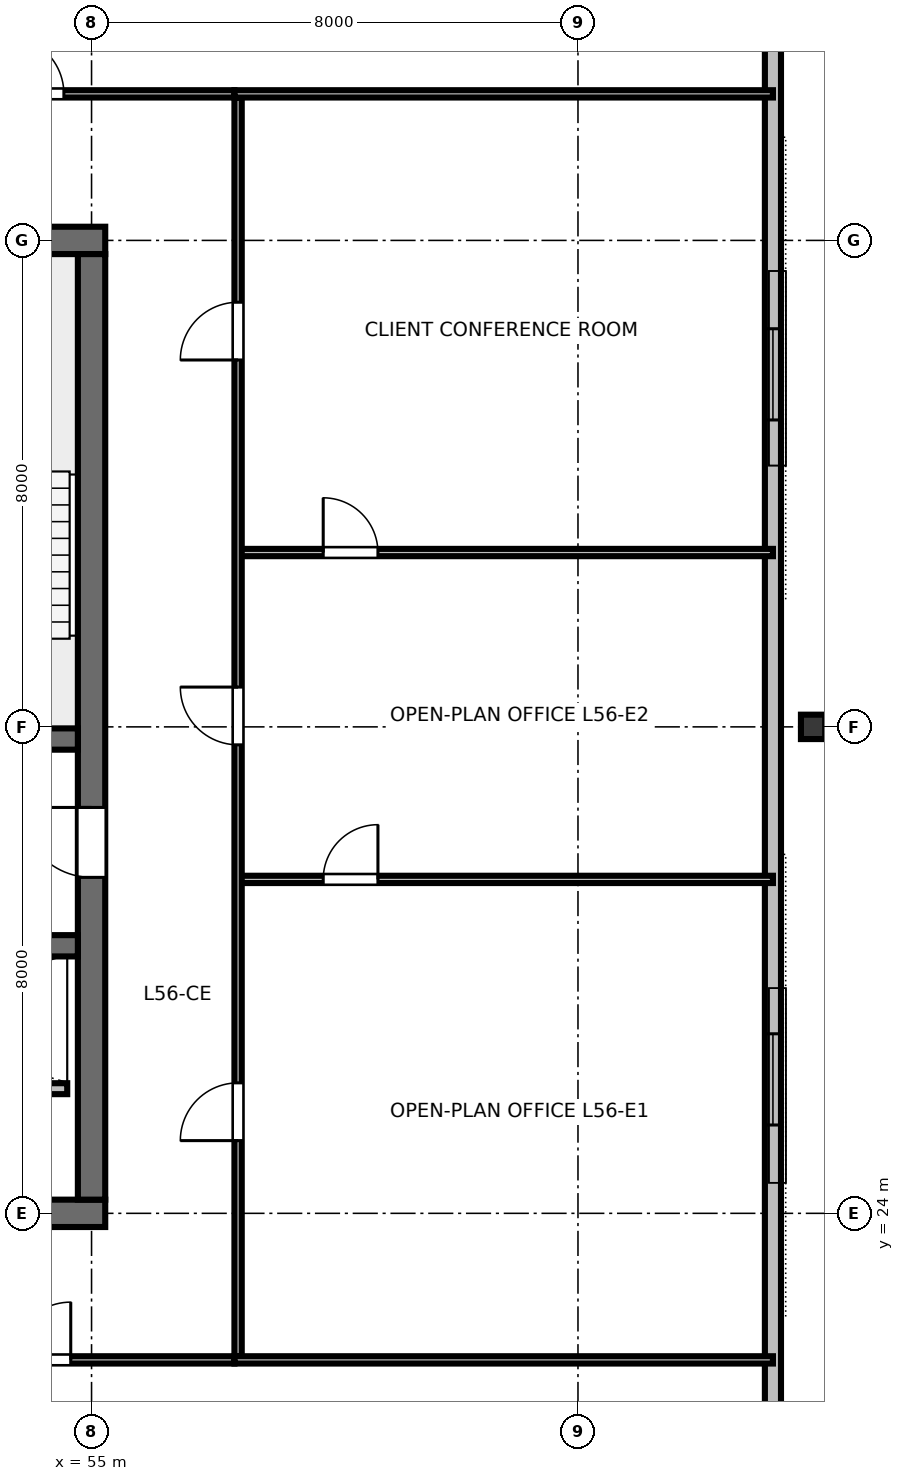
"""IFC4 building model, lengths in metres.
Left out: names, types, materials, properties, quantities, classifications, styles, units other than length and angle.
Written with IfcOpenShell. Run it as: python <this file> out.ifc"""

import sys

from ifc_helpers import new_model, si_unit, direction, frame, frame_2d, origin, origin_2d, place, context, subcontext, project, spatial, rectangle, i_section, extrude, element, fill, save


model = new_model("IFC4")
c1 = context("Model", 3, precision=1e-05, world=origin(), true_north=direction((0.0, 1.0)))
c2 = subcontext(c1, "Body", "Model", "MODEL_VIEW")
j1 = project(units=[si_unit("LENGTHUNIT", "METRE"), si_unit("PLANEANGLEUNIT", "RADIAN")], contexts=[c1])
p1 = place(None, origin())
s1 = spatial("IfcSite", under=j1, at=p1, CompositionType="ELEMENT")
p2 = place(p1, origin())
s2 = spatial("IfcBuilding", under=s1, at=p2, CompositionType="ELEMENT")
p3 = place(p2, frame((0.0, 0.0, 213.0)))
s3 = spatial("IfcBuildingStorey", under=s2, at=p3, CompositionType="ELEMENT", Elevation=213.0)
p4 = place(p3, frame((36.775, 24.0, 0.0), z_axis=(0.0, 0.0, 1.0), x_axis=(1.0, 0.0, 0.0)))
e1 = element("IfcWall", 1, at=p4, inside=s3, PredefinedType="SHEAR", context=c2, shape_type="SweptSolid", body=[
    extrude(rectangle(XDim=18.45, YDim=0.45, at=frame_2d((9.225, 0.0))), origin(), (0.0, 0.0, 1.0), 3.36),
])
p5 = place(p4, frame((13.425, 0.0, 0.0)))
e2 = element("IfcOpeningElement", 2, at=p5, cuts=e1, PredefinedType="OPENING", context=c2, shape_type="SweptSolid", body=[
    extrude(rectangle(XDim=1.6, YDim=2.15, at=frame_2d((0.8, 1.075))), frame((0.0, 0.235, 0.0), z_axis=(0.0, -1.0, 0.0), x_axis=(1.0, 0.0, 0.0)), (0.0, 0.0, 1.0), 0.47),
])
p6 = place(p3, frame((36.775, 40.0, 0.0), z_axis=(0.0, 0.0, 1.0), x_axis=(1.0, 0.0, 0.0)))
e3 = element("IfcWall", 3, at=p6, inside=s3, PredefinedType="SHEAR", context=c2, shape_type="SweptSolid", body=[
    extrude(rectangle(XDim=18.45, YDim=0.45, at=frame_2d((9.225, 0.0))), origin(), (0.0, 0.0, 1.0), 3.36),
])
p7 = place(p6, frame((8.725, 0.0, 0.0)))
e4 = element("IfcOpeningElement", 4, at=p7, cuts=e3, PredefinedType="OPENING", context=c2, shape_type="SweptSolid", body=[
    extrude(rectangle(XDim=1.0, YDim=2.15, at=frame_2d((0.5, 1.075))), frame((0.0, 0.235, 0.0), z_axis=(0.0, -1.0, 0.0), x_axis=(1.0, 0.0, 0.0)), (0.0, 0.0, 1.0), 0.47),
])
p8 = place(p3, frame((55.0, 24.225, 0.0), z_axis=(0.0, 0.0, 1.0), x_axis=(0.0, 1.0, 0.0)))
e5 = element("IfcWall", 5, at=p8, inside=s3, PredefinedType="SHEAR", context=c2, shape_type="SweptSolid", body=[
    extrude(rectangle(XDim=15.55, YDim=0.45, at=frame_2d((7.775, 0.0))), origin(), (0.0, 0.0, 1.0), 3.36),
])
p9 = place(p8, frame((5.3, 0.0, 0.0)))
e6 = element("IfcOpeningElement", 6, at=p9, cuts=e5, PredefinedType="OPENING", context=c2, shape_type="SweptSolid", body=[
    extrude(rectangle(XDim=1.15, YDim=2.15, at=frame_2d((0.575, 1.075))), frame((0.0, 0.235, 0.0), z_axis=(0.0, -1.0, 0.0), x_axis=(1.0, 0.0, 0.0)), (0.0, 0.0, 1.0), 0.47),
])
p10 = place(p3, frame((37.225, 31.8, 0.0), z_axis=(0.0, 0.0, 1.0), x_axis=(1.0, 0.0, 0.0)))
e7 = element("IfcWall", 7, at=p10, inside=s3, PredefinedType="SHEAR", context=c2, shape_type="SweptSolid", body=[
    extrude(rectangle(XDim=17.55, YDim=0.35, at=frame_2d((8.775, 0.0))), origin(), (0.0, 0.0, 1.0), 3.36),
])
p11 = place(p10, frame((0.825, 0.0, 0.0)))
e8 = element("IfcOpeningElement", 8, at=p11, cuts=e7, PredefinedType="OPENING", context=c2, shape_type="SweptSolid", body=[
    extrude(rectangle(XDim=1.1, YDim=2.15, at=frame_2d((0.55, 1.075))), frame((0.0, 0.185, 0.0), z_axis=(0.0, -1.0, 0.0), x_axis=(1.0, 0.0, 0.0)), (0.0, 0.0, 1.0), 0.37),
])
p12 = place(p10, frame((14.725, 0.0, 0.0)))
e9 = element("IfcOpeningElement", 9, at=p12, cuts=e7, PredefinedType="OPENING", context=c2, shape_type="SweptSolid", body=[
    extrude(rectangle(XDim=1.1, YDim=2.15, at=frame_2d((0.55, 1.075))), frame((0.0, 0.185, 0.0), z_axis=(0.0, -1.0, 0.0), x_axis=(1.0, 0.0, 0.0)), (0.0, 0.0, 1.0), 0.37),
])
p13 = place(p3, frame((37.225, 28.4, 0.0), z_axis=(0.0, 0.0, 1.0), x_axis=(1.0, 0.0, 0.0)))
e10 = element("IfcWall", 10, at=p13, inside=s3, PredefinedType="SHEAR", context=c2, shape_type="SweptSolid", body=[
    extrude(rectangle(XDim=17.55, YDim=0.35, at=frame_2d((8.775, 0.0))), origin(), (0.0, 0.0, 1.0), 3.36),
])
p14 = place(p3, frame((66.866, 32.0, 0.0), z_axis=(0.0, 0.0, 1.0), x_axis=(0.0, 1.0, 0.0)))
e11 = element("IfcColumn", 11, at=p14, inside=s3, PredefinedType="COLUMN", context=c2, shape_type="SweptSolid", body=[
    extrude(i_section(OverallWidth=0.401, OverallDepth=0.399, WebThickness=0.025, FlangeThickness=0.04, FilletRadius=0.025, at=origin_2d()), origin(), (0.0, 0.0, 1.0), 3.373),
])
p15 = place(p3, frame((66.206, 19.305, 0.0), z_axis=(0.0, 0.0, 1.0), x_axis=(0.0, 1.0, 0.0)))
e12 = element("IfcWall", 12, at=p15, inside=s3, PredefinedType="STANDARD", context=c2, shape_type="SweptSolid", body=[
    extrude(rectangle(XDim=25.389, YDim=0.265, at=frame_2d((12.695, 0.0))), origin(), (0.0, 0.0, 1.0), 3.375),
])
p16 = place(p15, frame((6.147, 0.0, 0.85)))
e13 = element("IfcOpeningElement", 13, at=p16, cuts=e12, PredefinedType="OPENING", context=c2, shape_type="SweptSolid", body=[
    extrude(rectangle(XDim=1.5, YDim=1.85, at=frame_2d((0.75, 0.925))), frame((0.0, 0.142, 0.0), z_axis=(0.0, -1.0, 0.0), x_axis=(1.0, 0.0, 0.0)), (0.0, 0.0, 1.0), 0.285),
])
p17 = place(p15, frame((17.742, 0.0, 0.85)))
e14 = element("IfcOpeningElement", 14, at=p17, cuts=e12, PredefinedType="OPENING", context=c2, shape_type="SweptSolid", body=[
    extrude(rectangle(XDim=1.5, YDim=1.85, at=frame_2d((0.75, 0.925))), frame((0.0, 0.142, 0.0), z_axis=(0.0, -1.0, 0.0), x_axis=(1.0, 0.0, 0.0)), (0.0, 0.0, 1.0), 0.285),
])
p18 = place(p3, frame((47.6, 26.05, 0.0), z_axis=(0.0, 0.0, 1.0), x_axis=(1.0, 0.0, 0.0)))
e15 = element("IfcWall", 15, at=p18, inside=s3, PredefinedType="PARTITIONING", context=c2, shape_type="SweptSolid", body=[
    extrude(rectangle(XDim=7.0, YDim=0.18, at=frame_2d((3.5, 0.0))), origin(), (0.0, 0.0, 1.0), 3.375),
])
p19 = place(p18, frame((1.2, 0.0, 0.0)))
e16 = element("IfcOpeningElement", 16, at=p19, cuts=e15, PredefinedType="OPENING", context=c2, shape_type="SweptSolid", body=[
    extrude(rectangle(XDim=1.05, YDim=2.15, at=frame_2d((0.525, 1.075))), frame((0.0, 0.1, 0.0), z_axis=(0.0, -1.0, 0.0), x_axis=(1.0, 0.0, 0.0)), (0.0, 0.0, 1.0), 0.2),
])
p20 = place(p18, frame((3.4, 0.0, 0.0)))
e17 = element("IfcOpeningElement", 17, at=p20, cuts=e15, PredefinedType="OPENING", context=c2, shape_type="SweptSolid", body=[
    extrude(rectangle(XDim=1.05, YDim=2.15, at=frame_2d((0.525, 1.075))), frame((0.0, 0.1, 0.0), z_axis=(0.0, -1.0, 0.0), x_axis=(1.0, 0.0, 0.0)), (0.0, 0.0, 1.0), 0.2),
])
p21 = place(p3, frame((47.02, 21.59, 0.0), z_axis=(0.0, 0.0, 1.0), x_axis=(1.0, 0.0, 0.0)))
e18 = element("IfcWall", 18, at=p21, inside=s3, PredefinedType="PARTITIONING", context=c2, shape_type="SweptSolid", body=[
    extrude(rectangle(XDim=10.33, YDim=0.12, at=frame_2d((5.165, 0.0))), origin(), (0.0, 0.0, 1.0), 2.655),
])
p22 = place(p21, frame((1.593, 0.0, 0.0)))
e19 = element("IfcOpeningElement", 19, at=p22, cuts=e18, PredefinedType="OPENING", context=c2, shape_type="SweptSolid", body=[
    extrude(rectangle(XDim=0.95, YDim=2.15, at=frame_2d((0.475, 1.075))), frame((0.0, 0.07, 0.0), z_axis=(0.0, -1.0, 0.0), x_axis=(1.0, 0.0, 0.0)), (0.0, 0.0, 1.0), 0.14),
])
p23 = place(p21, frame((6.688, 0.0, 0.0)))
e20 = element("IfcOpeningElement", 20, at=p23, cuts=e18, PredefinedType="OPENING", context=c2, shape_type="SweptSolid", body=[
    extrude(rectangle(XDim=0.95, YDim=2.15, at=frame_2d((0.475, 1.075))), frame((0.0, 0.07, 0.0), z_axis=(0.0, -1.0, 0.0), x_axis=(1.0, 0.0, 0.0)), (0.0, 0.0, 1.0), 0.14),
])
p24 = place(p3, frame((47.02, 42.41, 0.0), z_axis=(0.0, 0.0, 1.0), x_axis=(1.0, 0.0, 0.0)))
e21 = element("IfcWall", 21, at=p24, inside=s3, PredefinedType="PARTITIONING", context=c2, shape_type="SweptSolid", body=[
    extrude(rectangle(XDim=10.33, YDim=0.12, at=frame_2d((5.165, 0.0))), origin(), (0.0, 0.0, 1.0), 2.655),
])
p25 = place(p24, frame((1.48, 0.0, 0.0)))
e22 = element("IfcOpeningElement", 22, at=p25, cuts=e21, PredefinedType="OPENING", context=c2, shape_type="SweptSolid", body=[
    extrude(rectangle(XDim=0.95, YDim=2.15, at=frame_2d((0.475, 1.075))), frame((0.0, 0.07, 0.0), z_axis=(0.0, -1.0, 0.0), x_axis=(1.0, 0.0, 0.0)), (0.0, 0.0, 1.0), 0.14),
])
p26 = place(p24, frame((6.575, 0.0, 0.0)))
e23 = element("IfcOpeningElement", 23, at=p26, cuts=e21, PredefinedType="OPENING", context=c2, shape_type="SweptSolid", body=[
    extrude(rectangle(XDim=0.95, YDim=2.15, at=frame_2d((0.475, 1.075))), frame((0.0, 0.07, 0.0), z_axis=(0.0, -1.0, 0.0), x_axis=(1.0, 0.0, 0.0)), (0.0, 0.0, 1.0), 0.14),
])
p27 = place(p3, frame((57.41, 29.492, 0.0), z_axis=(0.0, 0.0, 1.0), x_axis=(1.0, 0.0, 0.0)))
e24 = element("IfcWall", 24, at=p27, inside=s3, PredefinedType="PARTITIONING", context=c2, shape_type="SweptSolid", body=[
    extrude(rectangle(XDim=8.796, YDim=0.12, at=frame_2d((4.398, 0.0))), origin(), (0.0, 0.0, 1.0), 2.655),
])
p28 = place(p27, frame((1.4, 0.0, 0.0)))
e25 = element("IfcOpeningElement", 25, at=p28, cuts=e24, PredefinedType="OPENING", context=c2, shape_type="SweptSolid", body=[
    extrude(rectangle(XDim=0.9, YDim=2.15, at=frame_2d((0.45, 1.075))), frame((0.0, 0.07, 0.0), z_axis=(0.0, -1.0, 0.0), x_axis=(1.0, 0.0, 0.0)), (0.0, 0.0, 1.0), 0.14),
])
p29 = place(p3, frame((57.41, 34.867, 0.0), z_axis=(0.0, 0.0, 1.0), x_axis=(1.0, 0.0, 0.0)))
e26 = element("IfcWall", 26, at=p29, inside=s3, PredefinedType="PARTITIONING", context=c2, shape_type="SweptSolid", body=[
    extrude(rectangle(XDim=8.796, YDim=0.12, at=frame_2d((4.398, 0.0))), origin(), (0.0, 0.0, 1.0), 2.655),
])
p30 = place(p29, frame((1.4, 0.0, 0.0)))
e27 = element("IfcOpeningElement", 27, at=p30, cuts=e26, PredefinedType="OPENING", context=c2, shape_type="SweptSolid", body=[
    extrude(rectangle(XDim=0.9, YDim=2.15, at=frame_2d((0.45, 1.075))), frame((0.0, 0.07, 0.0), z_axis=(0.0, -1.0, 0.0), x_axis=(1.0, 0.0, 0.0)), (0.0, 0.0, 1.0), 0.14),
])
p31 = place(p3, frame((57.41, 21.65, 0.0), z_axis=(0.0, 0.0, 1.0), x_axis=(0.0, 1.0, 0.0)))
e28 = element("IfcWall", 28, at=p31, inside=s3, PredefinedType="PARTITIONING", context=c2, shape_type="SweptSolid", body=[
    extrude(rectangle(XDim=20.7, YDim=0.12, at=frame_2d((10.35, 0.0))), origin(), (0.0, 0.0, 1.0), 2.655),
])
p32 = place(p31, frame((3.546, 0.0, 0.0)))
e29 = element("IfcOpeningElement", 29, at=p32, cuts=e28, PredefinedType="OPENING", context=c2, shape_type="SweptSolid", body=[
    extrude(rectangle(XDim=0.95, YDim=2.15, at=frame_2d((0.475, 1.075))), frame((0.0, 0.07, 0.0), z_axis=(0.0, -1.0, 0.0), x_axis=(1.0, 0.0, 0.0)), (0.0, 0.0, 1.0), 0.14),
])
p33 = place(p31, frame((10.054, 0.0, 0.0)))
e30 = element("IfcOpeningElement", 30, at=p33, cuts=e28, PredefinedType="OPENING", context=c2, shape_type="SweptSolid", body=[
    extrude(rectangle(XDim=0.95, YDim=2.15, at=frame_2d((0.475, 1.075))), frame((0.0, 0.07, 0.0), z_axis=(0.0, -1.0, 0.0), x_axis=(1.0, 0.0, 0.0)), (0.0, 0.0, 1.0), 0.14),
])
p34 = place(p31, frame((16.384, 0.0, 0.0)))
e31 = element("IfcOpeningElement", 31, at=p34, cuts=e28, PredefinedType="OPENING", context=c2, shape_type="SweptSolid", body=[
    extrude(rectangle(XDim=0.95, YDim=2.15, at=frame_2d((0.475, 1.075))), frame((0.0, 0.07, 0.0), z_axis=(0.0, -1.0, 0.0), x_axis=(1.0, 0.0, 0.0)), (0.0, 0.0, 1.0), 0.14),
])
for number, where, z_axis, x_axis in (
    (32, (57.35, 21.59, 0.0), (0.0, 0.0, 1.0), (1.0, 0.0, 0.0)),
    (33, (57.35, 42.41, 0.0), (0.0, 0.0, 1.0), (1.0, 0.0, 0.0)),
):
    element("IfcWall", number, at=place(p3, frame(where, z_axis=z_axis, x_axis=x_axis)), inside=s3, PredefinedType="PARTITIONING", context=c2, shape_type="SweptSolid", body=[
        extrude(rectangle(XDim=8.856, YDim=0.12, at=frame_2d((4.428, 0.0))), origin(), (0.0, 0.0, 1.0), 2.655),
    ])
p35 = place(p16, origin())
e34 = element("IfcWindow", 34, at=p35, inside=s3, PartitioningType="SINGLE_PANEL", PredefinedType="WINDOW", context=c2, shape_type="SweptSolid", body=[
    extrude(rectangle(XDim=1.5, YDim=1.85, at=frame_2d((0.75, 0.925))), frame((0.0, 0.03, 0.0), z_axis=(0.0, -1.0, 0.0), x_axis=(1.0, 0.0, 0.0)), (0.0, 0.0, 1.0), 0.06),
])
fill(e13, e34)
p36 = place(p17, origin())
e35 = element("IfcWindow", 35, at=p36, inside=s3, PartitioningType="SINGLE_PANEL", PredefinedType="WINDOW", context=c2, shape_type="SweptSolid", body=[
    extrude(rectangle(XDim=1.5, YDim=1.85, at=frame_2d((0.75, 0.925))), frame((0.0, 0.03, 0.0), z_axis=(0.0, -1.0, 0.0), x_axis=(1.0, 0.0, 0.0)), (0.0, 0.0, 1.0), 0.06),
])
fill(e14, e35)
p37 = place(p9, origin())
e36 = element("IfcDoor", 36, at=p37, inside=s3, OperationType="SINGLE_SWING_RIGHT", PredefinedType="DOOR", context=c2, shape_type="SweptSolid", body=[
    extrude(rectangle(XDim=1.15, YDim=2.15, at=frame_2d((0.575, 1.075))), frame((0.0, 0.025, 0.0), z_axis=(0.0, -1.0, 0.0), x_axis=(1.0, 0.0, 0.0)), (0.0, 0.0, 1.0), 0.05),
])
fill(e6, e36)
p38 = place(p23, origin())
e37 = element("IfcDoor", 37, at=p38, inside=s3, OperationType="SINGLE_SWING_RIGHT", PredefinedType="DOOR", context=c2, shape_type="SweptSolid", body=[
    extrude(rectangle(XDim=0.95, YDim=2.15, at=frame_2d((0.475, 1.075))), frame((0.0, 0.025, 0.0), z_axis=(0.0, -1.0, 0.0), x_axis=(1.0, 0.0, 0.0)), (0.0, 0.0, 1.0), 0.05),
])
fill(e20, e37)
p39 = place(p26, origin())
e38 = element("IfcDoor", 38, at=p39, inside=s3, OperationType="SINGLE_SWING_LEFT", PredefinedType="DOOR", context=c2, shape_type="SweptSolid", body=[
    extrude(rectangle(XDim=0.95, YDim=2.15, at=frame_2d((0.475, 1.075))), frame((0.0, 0.025, 0.0), z_axis=(0.0, -1.0, 0.0), x_axis=(1.0, 0.0, 0.0)), (0.0, 0.0, 1.0), 0.05),
])
fill(e23, e38)
p40 = place(p28, origin())
e39 = element("IfcDoor", 39, at=p40, inside=s3, OperationType="SINGLE_SWING_RIGHT", PredefinedType="DOOR", context=c2, shape_type="SweptSolid", body=[
    extrude(rectangle(XDim=0.9, YDim=2.15, at=frame_2d((0.45, 1.075))), frame((0.0, 0.025, 0.0), z_axis=(0.0, -1.0, 0.0), x_axis=(1.0, 0.0, 0.0)), (0.0, 0.0, 1.0), 0.05),
])
fill(e25, e39)
p41 = place(p30, origin())
e40 = element("IfcDoor", 40, at=p41, inside=s3, OperationType="SINGLE_SWING_LEFT", PredefinedType="DOOR", context=c2, shape_type="SweptSolid", body=[
    extrude(rectangle(XDim=0.9, YDim=2.15, at=frame_2d((0.45, 1.075))), frame((0.0, 0.025, 0.0), z_axis=(0.0, -1.0, 0.0), x_axis=(1.0, 0.0, 0.0)), (0.0, 0.0, 1.0), 0.05),
])
fill(e27, e40)
p42 = place(p32, origin())
e41 = element("IfcDoor", 41, at=p42, inside=s3, OperationType="SINGLE_SWING_LEFT", PredefinedType="DOOR", context=c2, shape_type="SweptSolid", body=[
    extrude(rectangle(XDim=0.95, YDim=2.15, at=frame_2d((0.475, 1.075))), frame((0.0, 0.025, 0.0), z_axis=(0.0, -1.0, 0.0), x_axis=(1.0, 0.0, 0.0)), (0.0, 0.0, 1.0), 0.05),
])
fill(e29, e41)
p43 = place(p33, origin())
e42 = element("IfcDoor", 42, at=p43, inside=s3, OperationType="SINGLE_SWING_RIGHT", PredefinedType="DOOR", context=c2, shape_type="SweptSolid", body=[
    extrude(rectangle(XDim=0.95, YDim=2.15, at=frame_2d((0.475, 1.075))), frame((0.0, 0.025, 0.0), z_axis=(0.0, -1.0, 0.0), x_axis=(1.0, 0.0, 0.0)), (0.0, 0.0, 1.0), 0.05),
])
fill(e30, e42)
p44 = place(p34, origin())
e43 = element("IfcDoor", 43, at=p44, inside=s3, OperationType="SINGLE_SWING_LEFT", PredefinedType="DOOR", context=c2, shape_type="SweptSolid", body=[
    extrude(rectangle(XDim=0.95, YDim=2.15, at=frame_2d((0.475, 1.075))), frame((0.0, 0.025, 0.0), z_axis=(0.0, -1.0, 0.0), x_axis=(1.0, 0.0, 0.0)), (0.0, 0.0, 1.0), 0.05),
])
fill(e31, e43)
save(model, sys.argv[1])
